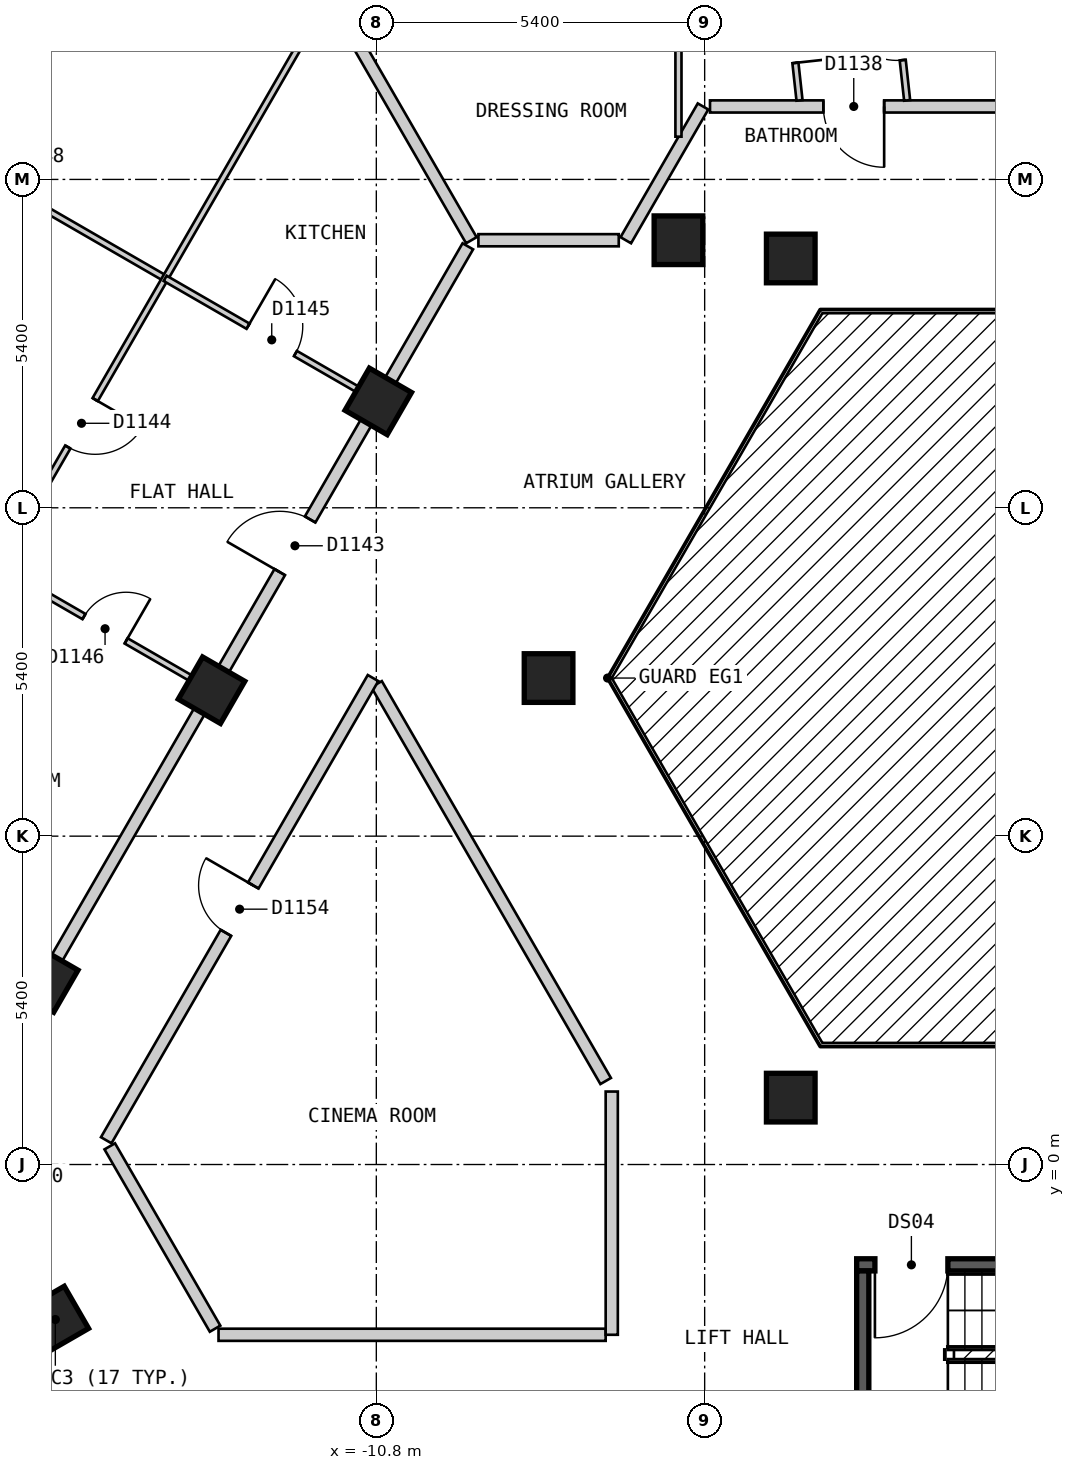
"""IFC4 building model, lengths in metres.
Left out: names, types, materials, properties, quantities, classifications, styles, units other than length and angle.
Written with IfcOpenShell. Run it as: python <this file> out.ifc"""

import sys

from ifc_helpers import new_model, si_unit, direction, frame, frame_2d, origin, origin_2d, place, context, subcontext, project, spatial, polyline, rectangle, outline, extrude, element, fill, save


model = new_model("IFC4")
c1 = context("Model", 3, precision=1e-05, world=origin(), true_north=direction((0.0, 1.0)))
c2 = subcontext(c1, "Body", "Model", "MODEL_VIEW")
j1 = project(units=[si_unit("LENGTHUNIT", "METRE"), si_unit("PLANEANGLEUNIT", "RADIAN")], contexts=[c1])
p1 = place(None, origin())
s1 = spatial("IfcSite", under=j1, at=p1, CompositionType="ELEMENT")
p2 = place(p1, origin())
s2 = spatial("IfcBuilding", under=s1, at=p2, CompositionType="ELEMENT")
p3 = place(p2, frame((0.0, 0.0, 150.6)))
s3 = spatial("IfcBuildingStorey", under=s2, at=p3, CompositionType="ELEMENT", Elevation=150.6)
for number, where, z_axis, x_axis in (
    (1, (-16.079, -2.549, 0.0), (0.0, 0.0, 1.0), (0.5, -0.866, 0.0)),
    (2, (-3.984, 14.9, 0.0), (0.0, 0.0, 1.0), (1.0, 0.0, 0.0)),
    (3, (-5.831, 15.2, 0.0), (0.0, 0.0, 1.0), (-1.0, 0.0, 0.0)),
    (4, (-10.768, 12.55, 0.0), (0.0, 0.0, 1.0), (-0.5, -0.866, 0.0)),
    (5, (-7.967, 8.0, 0.0), (0.0, 0.0, 1.0), (1.0, 0.0, 0.0)),
    (6, (-13.51, 7.8, 0.0), (0.0, 0.0, 1.0), (-0.5, -0.866, 0.0)),
    (7, (-3.984, 1.1, 0.0), (0.0, 0.0, 1.0), (1.0, 0.0, 0.0)),
    (8, (-16.253, 3.05, 0.0), (0.0, 0.0, 1.0), (-0.5, -0.866, 0.0)),
):
    element("IfcColumn", number, at=place(p3, frame(where, z_axis=z_axis, x_axis=x_axis)), inside=s3, PredefinedType="COLUMN", context=c2, shape_type="SweptSolid", body=[
        extrude(rectangle(XDim=0.8, YDim=0.8, at=origin_2d()), origin(), (0.0, 0.0, 1.0), 3.0),
    ])
p4 = place(p3, frame((-28.218, -2.025, 0.0), z_axis=(0.0, 0.0, 1.0), x_axis=(0.500017503135, -0.866015298109, 0.0)))
e9 = element("IfcWall", 9, at=p4, inside=s3, PredefinedType="SOLIDWALL", context=c2, shape_type="SweptSolid", body=[
    extrude(outline(polyline([(0.0, -0.15), (24.711, -0.15), (24.631, 0.15), (0.08, 0.15), (0.0, -0.15)])), origin(), (0.0, 0.0, 1.0), 2.6),
])
p5 = place(p4, frame((1.4, 0.0, 0.15)))
e10 = element("IfcOpeningElement", 10, at=p5, cuts=e9, PredefinedType="OPENING", context=c2, shape_type="SweptSolid", body=[
    extrude(rectangle(XDim=1.5, YDim=2.1, at=frame_2d((0.75, 1.05))), frame((0.0, 0.16, 0.0), z_axis=(0.0, -1.0, 0.0), x_axis=(1.0, 0.0, 0.0)), (0.0, 0.0, 1.0), 0.32),
])
p6 = place(p4, frame((4.316, 0.0, 0.15)))
e11 = element("IfcOpeningElement", 11, at=p6, cuts=e9, PredefinedType="OPENING", context=c2, shape_type="SweptSolid", body=[
    extrude(rectangle(XDim=1.5, YDim=2.1, at=frame_2d((0.75, 1.05))), frame((0.0, 0.16, 0.0), z_axis=(0.0, -1.0, 0.0), x_axis=(1.0, 0.0, 0.0)), (0.0, 0.0, 1.0), 0.32),
])
p7 = place(p4, frame((7.231, 0.0, 0.15)))
e12 = element("IfcOpeningElement", 12, at=p7, cuts=e9, PredefinedType="OPENING", context=c2, shape_type="SweptSolid", body=[
    extrude(rectangle(XDim=1.5, YDim=2.1, at=frame_2d((0.75, 1.05))), frame((0.0, 0.16, 0.0), z_axis=(0.0, -1.0, 0.0), x_axis=(1.0, 0.0, 0.0)), (0.0, 0.0, 1.0), 0.32),
])
p8 = place(p4, frame((10.147, 0.0, 0.15)))
e13 = element("IfcOpeningElement", 13, at=p8, cuts=e9, PredefinedType="OPENING", context=c2, shape_type="SweptSolid", body=[
    extrude(rectangle(XDim=1.5, YDim=2.1, at=frame_2d((0.75, 1.05))), frame((0.0, 0.16, 0.0), z_axis=(0.0, -1.0, 0.0), x_axis=(1.0, 0.0, 0.0)), (0.0, 0.0, 1.0), 0.32),
])
p9 = place(p4, frame((13.062, 0.0, 0.15)))
e14 = element("IfcOpeningElement", 14, at=p9, cuts=e9, PredefinedType="OPENING", context=c2, shape_type="SweptSolid", body=[
    extrude(rectangle(XDim=1.5, YDim=2.1, at=frame_2d((0.75, 1.05))), frame((0.0, 0.16, 0.0), z_axis=(0.0, -1.0, 0.0), x_axis=(1.0, 0.0, 0.0)), (0.0, 0.0, 1.0), 0.32),
])
p10 = place(p4, frame((15.977, 0.0, 0.15)))
e15 = element("IfcOpeningElement", 15, at=p10, cuts=e9, PredefinedType="OPENING", context=c2, shape_type="SweptSolid", body=[
    extrude(rectangle(XDim=1.5, YDim=2.1, at=frame_2d((0.75, 1.05))), frame((0.0, 0.16, 0.0), z_axis=(0.0, -1.0, 0.0), x_axis=(1.0, 0.0, 0.0)), (0.0, 0.0, 1.0), 0.32),
])
p11 = place(p4, frame((18.893, 0.0, 0.15)))
e16 = element("IfcOpeningElement", 16, at=p11, cuts=e9, PredefinedType="OPENING", context=c2, shape_type="SweptSolid", body=[
    extrude(rectangle(XDim=1.5, YDim=2.1, at=frame_2d((0.75, 1.05))), frame((0.0, 0.16, 0.0), z_axis=(0.0, -1.0, 0.0), x_axis=(1.0, 0.0, 0.0)), (0.0, 0.0, 1.0), 0.32),
])
p12 = place(p4, frame((21.809, 0.0, 0.15)))
e17 = element("IfcOpeningElement", 17, at=p12, cuts=e9, PredefinedType="OPENING", context=c2, shape_type="SweptSolid", body=[
    extrude(rectangle(XDim=1.5, YDim=2.1, at=frame_2d((0.75, 1.05))), frame((0.0, 0.16, 0.0), z_axis=(0.0, -1.0, 0.0), x_axis=(1.0, 0.0, 0.0)), (0.0, 0.0, 1.0), 0.32),
])
p13 = place(p3, frame((-2.9, -1.65, 0.0), z_axis=(0.0, 0.0, 1.0), x_axis=(1.0, 0.0, 0.0)))
e18 = element("IfcWall", 18, at=p13, inside=s3, PredefinedType="SOLIDWALL", context=c2, shape_type="SweptSolid", body=[
    extrude(rectangle(XDim=5.8, YDim=0.2, at=frame_2d((2.9, 0.0))), origin(), (0.0, 0.0, 1.0), 2.6),
])
p14 = place(p13, frame((0.3, 0.0, 0.0)))
e19 = element("IfcOpeningElement", 19, at=p14, cuts=e18, PredefinedType="OPENING", context=c2, shape_type="SweptSolid", body=[
    extrude(rectangle(XDim=1.2, YDim=2.1, at=frame_2d((0.6, 1.05))), frame((0.0, 0.11, 0.0), z_axis=(0.0, -1.0, 0.0), x_axis=(1.0, 0.0, 0.0)), (0.0, 0.0, 1.0), 0.22),
])
p15 = place(p3, frame((-2.8, -4.5, 0.0), z_axis=(0.0, 0.0, 1.0), x_axis=(0.0, 1.0, 0.0)))
e20 = element("IfcWall", 20, at=p15, inside=s3, PredefinedType="SOLIDWALL", context=c2, shape_type="SweptSolid", body=[
    extrude(rectangle(XDim=2.75, YDim=0.2, at=frame_2d((1.375, 0.0))), origin(), (0.0, 0.0, 1.0), 2.6),
])
p16 = place(p3, frame((-10.796, 7.9, 0.0), z_axis=(0.0, 0.0, 1.0), x_axis=(0.499954271211, -0.866051803703, 0.0)))
e21 = element("IfcWall", 21, at=p16, inside=s3, PredefinedType="PARTITIONING", context=c2, shape_type="SweptSolid", body=[
    extrude(rectangle(XDim=7.536, YDim=0.2, at=frame_2d((3.768, 0.0))), origin(), (0.0, 0.0, 1.0), 2.6),
])
p17 = place(p3, frame((-15.184, 0.299, 0.0), z_axis=(0.0, 0.0, 1.0), x_axis=(0.500149577091, -0.865939028186, 0.0)))
e22 = element("IfcWall", 22, at=p17, inside=s3, PredefinedType="PARTITIONING", context=c2, shape_type="SweptSolid", body=[
    extrude(rectangle(XDim=3.463, YDim=0.2, at=frame_2d((1.732, 0.0))), origin(), (0.0, 0.0, 1.0), 2.6),
])
p18 = place(p3, frame((-17.724, 0.299, 0.0), z_axis=(0.0, 0.0, 1.0), x_axis=(0.499910220442, -0.866077231832, 0.0)))
e23 = element("IfcWall", 23, at=p18, inside=s3, PredefinedType="PARTITIONING", context=c2, shape_type="SweptSolid", body=[
    extrude(rectangle(XDim=3.189, YDim=0.2, at=frame_2d((1.594, 0.0))), origin(), (0.0, 0.0, 1.0), 2.6),
])
p19 = place(p18, frame((0.183, 0.0, 0.0)))
e24 = element("IfcOpeningElement", 24, at=p19, cuts=e23, PredefinedType="OPENING", context=c2, shape_type="SweptSolid", body=[
    extrude(rectangle(XDim=0.8, YDim=2.1, at=frame_2d((0.4, 1.05))), frame((0.0, 0.11, 0.0), z_axis=(0.0, -1.0, 0.0), x_axis=(1.0, 0.0, 0.0)), (0.0, 0.0, 1.0), 0.22),
])
p20 = place(p3, frame((-13.395, -2.8, 0.0), z_axis=(0.0, 0.0, 1.0), x_axis=(1.0, 0.0, 0.0)))
e25 = element("IfcWall", 25, at=p20, inside=s3, PredefinedType="PARTITIONING", context=c2, shape_type="SweptSolid", body=[
    extrude(rectangle(XDim=6.367, YDim=0.2, at=frame_2d((3.184, 0.0))), origin(), (0.0, 0.0, 1.0), 2.6),
])
p21 = place(p3, frame((-9.121, 15.2, 0.0), z_axis=(0.0, 0.0, 1.0), x_axis=(1.0, 0.0, 0.0)))
e26 = element("IfcWall", 26, at=p21, inside=s3, PredefinedType="PARTITIONING", context=c2, shape_type="SweptSolid", body=[
    extrude(rectangle(XDim=2.308, YDim=0.2, at=frame_2d((1.154, 0.0))), origin(), (0.0, 0.0, 1.0), 2.6),
])
p22 = place(p3, frame((-5.312, 17.4, 0.0), z_axis=(0.0, 0.0, 1.0), x_axis=(1.0, 0.0, 0.0)))
e27 = element("IfcWall", 27, at=p22, inside=s3, PredefinedType="PARTITIONING", context=c2, shape_type="SweptSolid", body=[
    extrude(rectangle(XDim=10.739, YDim=0.2, at=frame_2d((5.37, 0.0))), origin(), (0.0, 0.0, 1.0), 2.6),
])
p23 = place(p22, frame((7.538, 0.0, 0.0)))
e28 = element("IfcOpeningElement", 28, at=p23, cuts=e27, PredefinedType="OPENING", context=c2, shape_type="SweptSolid", body=[
    extrude(rectangle(XDim=1.0, YDim=2.1, at=frame_2d((0.5, 1.05))), frame((0.0, 0.11, 0.0), z_axis=(0.0, -1.0, 0.0), x_axis=(1.0, 0.0, 0.0)), (0.0, 0.0, 1.0), 0.22),
])
p24 = place(p22, frame((1.864, 0.0, 0.0)))
e29 = element("IfcOpeningElement", 29, at=p24, cuts=e27, PredefinedType="OPENING", context=c2, shape_type="SweptSolid", body=[
    extrude(rectangle(XDim=1.0, YDim=2.1, at=frame_2d((0.5, 1.05))), frame((0.0, 0.11, 0.0), z_axis=(0.0, -1.0, 0.0), x_axis=(1.0, 0.0, 0.0)), (0.0, 0.0, 1.0), 0.22),
])
p25 = place(p3, frame((-15.242, 0.399, 0.0), z_axis=(0.0, 0.0, 1.0), x_axis=(0.499953615651, 0.866052182145, 0.0)))
e30 = element("IfcWall", 30, at=p25, inside=s3, PredefinedType="PARTITIONING", context=c2, shape_type="SweptSolid", body=[
    extrude(rectangle(XDim=8.777, YDim=0.2, at=frame_2d((4.388, 0.0))), origin(), (0.0, 0.0, 1.0), 2.6),
])
p26 = place(p25, frame((3.938, 0.0, 0.0)))
e31 = element("IfcOpeningElement", 31, at=p26, cuts=e30, PredefinedType="OPENING", context=c2, shape_type="SweptSolid", body=[
    extrude(rectangle(XDim=0.9, YDim=2.1, at=frame_2d((0.45, 1.05))), frame((0.0, 0.11, 0.0), z_axis=(0.0, -1.0, 0.0), x_axis=(1.0, 0.0, 0.0)), (0.0, 0.0, 1.0), 0.22),
])
p27 = place(p3, frame((-6.697, 15.2, 0.0), z_axis=(0.0, 0.0, 1.0), x_axis=(0.499963722229, 0.866046347752, 0.0)))
e32 = element("IfcWall", 32, at=p27, inside=s3, PredefinedType="PARTITIONING", context=c2, shape_type="SweptSolid", body=[
    extrude(rectangle(XDim=2.54, YDim=0.2, at=frame_2d((1.27, 0.0))), origin(), (0.0, 0.0, 1.0), 2.6),
])
p28 = place(p3, frame((-17.724, 0.5, 0.0), z_axis=(0.0, 0.0, 1.0), x_axis=(0.499992388462, 0.866029798263, 0.0)))
e33 = element("IfcWall", 33, at=p28, inside=s3, PredefinedType="PARTITIONING", context=c2, shape_type="SweptSolid", body=[
    extrude(rectangle(XDim=16.859, YDim=0.2, at=frame_2d((8.429, 0.0))), origin(), (0.0, 0.0, 1.0), 2.6),
])
p29 = place(p28, frame((10.672, 0.0, 0.0)))
e34 = element("IfcOpeningElement", 34, at=p29, cuts=e33, PredefinedType="OPENING", context=c2, shape_type="SweptSolid", body=[
    extrude(rectangle(XDim=1.0, YDim=2.1, at=frame_2d((0.5, 1.05))), frame((0.0, 0.11, 0.0), z_axis=(0.0, -1.0, 0.0), x_axis=(1.0, 0.0, 0.0)), (0.0, 0.0, 1.0), 0.22),
])
p30 = place(p3, frame((-6.928, -2.8, 0.0), z_axis=(0.0, 0.0, 1.0), x_axis=(0.0, 1.0, 0.0)))
e35 = element("IfcWall", 35, at=p30, inside=s3, PredefinedType="PARTITIONING", context=c2, shape_type="SweptSolid", body=[
    extrude(rectangle(XDim=4.0, YDim=0.2, at=frame_2d((2.0, 0.0))), origin(), (0.0, 0.0, 1.0), 2.6),
])
p31 = place(p3, frame((-2.319, 19.77, 0.0), z_axis=(0.0, 0.0, 1.0), x_axis=(0.109046821538, -0.994036614372, 0.0)))
e36 = element("IfcWall", 36, at=p31, inside=s3, PredefinedType="PARTITIONING", context=c2, shape_type="SweptSolid", body=[
    extrude(rectangle(XDim=2.284, YDim=0.1, at=frame_2d((1.142, 0.0))), origin(), (0.0, 0.0, 1.0), 2.6),
])
p32 = place(p31, frame((0.717, 0.0, 0.0)))
e37 = element("IfcOpeningElement", 37, at=p32, cuts=e36, PredefinedType="OPENING", context=c2, shape_type="SweptSolid", body=[
    extrude(rectangle(XDim=0.9, YDim=2.1, at=frame_2d((0.45, 1.05))), frame((0.0, 0.06, 0.0), z_axis=(0.0, -1.0, 0.0), x_axis=(1.0, 0.0, 0.0)), (0.0, 0.0, 1.0), 0.12),
])
p33 = place(p3, frame((-4.068, 19.579, 0.0), z_axis=(0.0, 0.0, 1.0), x_axis=(0.109022161139, -0.994039319333, 0.0)))
e38 = element("IfcWall", 38, at=p33, inside=s3, PredefinedType="PARTITIONING", context=c2, shape_type="SweptSolid", body=[
    extrude(rectangle(XDim=2.092, YDim=0.1, at=frame_2d((1.046, 0.0))), origin(), (0.0, 0.0, 1.0), 2.6),
])
p34 = place(p33, frame((0.671, 0.0, 0.0)))
e39 = element("IfcOpeningElement", 39, at=p34, cuts=e38, PredefinedType="OPENING", context=c2, shape_type="SweptSolid", body=[
    extrude(rectangle(XDim=0.8, YDim=2.1, at=frame_2d((0.4, 1.05))), frame((0.0, 0.06, 0.0), z_axis=(0.0, -1.0, 0.0), x_axis=(1.0, 0.0, 0.0)), (0.0, 0.0, 1.0), 0.12),
])
p35 = place(p3, frame((-16.971, 9.798, 0.0), z_axis=(0.0, 0.0, 1.0), x_axis=(0.866087525071, -0.499892387336, 0.0)))
e40 = element("IfcWall", 40, at=p35, inside=s3, PredefinedType="PARTITIONING", context=c2, shape_type="SweptSolid", body=[
    extrude(rectangle(XDim=3.897, YDim=0.1, at=frame_2d((1.948, 0.0))), origin(), (0.0, 0.0, 1.0), 2.6),
])
p36 = place(p35, frame((1.574, 0.0, 0.0)))
e41 = element("IfcOpeningElement", 41, at=p36, cuts=e40, PredefinedType="OPENING", context=c2, shape_type="SweptSolid", body=[
    extrude(rectangle(XDim=0.8, YDim=2.1, at=frame_2d((0.4, 1.05))), frame((0.0, 0.06, 0.0), z_axis=(0.0, -1.0, 0.0), x_axis=(1.0, 0.0, 0.0)), (0.0, 0.0, 1.0), 0.12),
])
p37 = place(p3, frame((-19.514, 17.599, 0.0), z_axis=(0.0, 0.0, 1.0), x_axis=(0.866007554612, -0.500030914399, 0.0)))
e42 = element("IfcWall", 42, at=p37, inside=s3, PredefinedType="PARTITIONING", context=c2, shape_type="SweptSolid", body=[
    extrude(rectangle(XDim=6.052, YDim=0.1, at=frame_2d((3.026, 0.0))), origin(), (0.0, 0.0, 1.0), 2.6),
])
p38 = place(p37, frame((2.576, 0.0, 0.0)))
e43 = element("IfcOpeningElement", 43, at=p38, cuts=e42, PredefinedType="OPENING", context=c2, shape_type="SweptSolid", body=[
    extrude(rectangle(XDim=0.9, YDim=2.1, at=frame_2d((0.45, 1.05))), frame((0.0, 0.06, 0.0), z_axis=(0.0, -1.0, 0.0), x_axis=(1.0, 0.0, 0.0)), (0.0, 0.0, 1.0), 0.12),
])
p39 = place(p3, frame((-22.398, 0.499, 0.0), z_axis=(0.0, 0.0, 1.0), x_axis=(0.499981561717, 0.866036048871, 0.0)))
e44 = element("IfcWall", 44, at=p39, inside=s3, PredefinedType="PARTITIONING", context=c2, shape_type="SweptSolid", body=[
    extrude(rectangle(XDim=21.532, YDim=0.1, at=frame_2d((10.766, 0.0))), origin(), (0.0, 0.0, 1.0), 2.6),
])
p40 = place(p39, frame((13.049, 0.0, 0.0)))
e45 = element("IfcOpeningElement", 45, at=p40, cuts=e44, PredefinedType="OPENING", context=c2, shape_type="SweptSolid", body=[
    extrude(rectangle(XDim=0.9, YDim=2.1, at=frame_2d((0.45, 1.05))), frame((0.0, 0.06, 0.0), z_axis=(0.0, -1.0, 0.0), x_axis=(1.0, 0.0, 0.0)), (0.0, 0.0, 1.0), 0.12),
])
p41 = place(p39, frame((2.183, 0.0, 0.0)))
e46 = element("IfcOpeningElement", 46, at=p41, cuts=e44, PredefinedType="OPENING", context=c2, shape_type="SweptSolid", body=[
    extrude(rectangle(XDim=0.8, YDim=2.1, at=frame_2d((0.4, 1.05))), frame((0.0, 0.06, 0.0), z_axis=(0.0, -1.0, 0.0), x_axis=(1.0, 0.0, 0.0)), (0.0, 0.0, 1.0), 0.12),
])
p42 = place(p3, frame((-5.831, 16.903, 0.0), z_axis=(0.0, 0.0, 1.0), x_axis=(0.0, 1.0, 0.0)))
e47 = element("IfcWall", 47, at=p42, inside=s3, PredefinedType="PARTITIONING", context=c2, shape_type="SweptSolid", body=[
    extrude(rectangle(XDim=2.553, YDim=0.1, at=frame_2d((1.276, 0.0))), origin(), (0.0, 0.0, 1.0), 2.6),
])
p43 = place(p3, frame((-11.52, 19.155, 0.0), z_axis=(0.0, 0.0, 1.0), x_axis=(0.499916824138, -0.866073420066, 0.0)))
e48 = element("IfcWall", 48, at=p43, inside=s3, PredefinedType="PARTITIONING", context=c2, shape_type="SweptSolid", body=[
    extrude(rectangle(XDim=4.567, YDim=0.2, at=frame_2d((2.283, 0.0))), origin(), (0.0, 0.0, 1.0), 2.6),
])
p44 = place(p3, frame((-17.956, -3.783, 0.0), z_axis=(0.0, 0.0, 1.0), x_axis=(0.964815336827, -0.2629284424, 0.0)))
e49 = element("IfcWall", 49, at=p44, inside=s3, PredefinedType="PARTITIONING", context=c2, shape_type="SweptSolid", body=[
    extrude(rectangle(XDim=2.514, YDim=0.2, at=frame_2d((1.257, 0.0))), origin(), (0.0, 0.0, 1.0), 2.6),
])
p45 = place(p3, frame((-18.096, -3.714, 0.0), z_axis=(0.0, 0.0, 1.0), x_axis=(0.865794513859, 0.500399700011, 0.0)))
e50 = element("IfcWall", 50, at=p45, inside=s3, PredefinedType="PARTITIONING", context=c2, shape_type="SweptSolid", body=[
    extrude(rectangle(XDim=2.298, YDim=0.2, at=frame_2d((1.149, 0.0))), origin(), (0.0, 0.0, 1.0), 2.6),
])
p46 = place(p3, frame((-14.273, 14.573, 0.0), z_axis=(0.0, 0.0, 1.0), x_axis=(0.866138216955, -0.499804550929, 0.0)))
e51 = element("IfcWall", 51, at=p46, inside=s3, PredefinedType="PARTITIONING", context=c2, shape_type="SweptSolid", body=[
    extrude(rectangle(XDim=3.947, YDim=0.1, at=frame_2d((1.974, 0.0))), origin(), (0.0, 0.0, 1.0), 2.6),
])
p47 = place(p46, frame((1.574, 0.0, 0.0)))
e52 = element("IfcOpeningElement", 52, at=p47, cuts=e51, PredefinedType="OPENING", context=c2, shape_type="SweptSolid", body=[
    extrude(rectangle(XDim=0.9, YDim=2.1, at=frame_2d((0.45, 1.05))), frame((0.0, 0.06, 0.0), z_axis=(0.0, -1.0, 0.0), x_axis=(1.0, 0.0, 0.0)), (0.0, 0.0, 1.0), 0.12),
])
p48 = place(p14, origin())
e53 = element("IfcDoor", 53, at=p48, inside=s3, OperationType="SINGLE_SWING_LEFT", PredefinedType="DOOR", context=c2, shape_type="SweptSolid", body=[
    extrude(rectangle(XDim=1.2, YDim=2.1, at=frame_2d((0.6, 1.05))), frame((0.0, 0.025, 0.0), z_axis=(0.0, -1.0, 0.0), x_axis=(1.0, 0.0, 0.0)), (0.0, 0.0, 1.0), 0.05),
])
fill(e19, e53)
p49 = place(p24, origin())
e54 = element("IfcDoor", 54, at=p49, inside=s3, OperationType="SINGLE_SWING_RIGHT", PredefinedType="DOOR", context=c2, shape_type="SweptSolid", body=[
    extrude(rectangle(XDim=1.0, YDim=2.1, at=frame_2d((0.5, 1.05))), frame((0.0, 0.025, 0.0), z_axis=(0.0, -1.0, 0.0), x_axis=(1.0, 0.0, 0.0)), (0.0, 0.0, 1.0), 0.05),
])
fill(e29, e54)
p50 = place(p32, origin())
e55 = element("IfcDoor", 55, at=p50, inside=s3, OperationType="SINGLE_SWING_LEFT", PredefinedType="DOOR", context=c2, shape_type="SweptSolid", body=[
    extrude(rectangle(XDim=0.9, YDim=2.1, at=frame_2d((0.45, 1.05))), frame((0.0, 0.025, 0.0), z_axis=(0.0, -1.0, 0.0), x_axis=(1.0, 0.0, 0.0)), (0.0, 0.0, 1.0), 0.05),
])
fill(e37, e55)
p51 = place(p34, origin())
e56 = element("IfcDoor", 56, at=p51, inside=s3, OperationType="SINGLE_SWING_RIGHT", PredefinedType="DOOR", context=c2, shape_type="SweptSolid", body=[
    extrude(rectangle(XDim=0.8, YDim=2.1, at=frame_2d((0.4, 1.05))), frame((0.0, 0.025, 0.0), z_axis=(0.0, -1.0, 0.0), x_axis=(1.0, 0.0, 0.0)), (0.0, 0.0, 1.0), 0.05),
])
fill(e39, e56)
p52 = place(p29, origin())
e57 = element("IfcDoor", 57, at=p52, inside=s3, OperationType="SINGLE_SWING_LEFT", PredefinedType="DOOR", context=c2, shape_type="SweptSolid", body=[
    extrude(rectangle(XDim=1.0, YDim=2.1, at=frame_2d((0.5, 1.05))), frame((0.0, 0.025, 0.0), z_axis=(0.0, -1.0, 0.0), x_axis=(1.0, 0.0, 0.0)), (0.0, 0.0, 1.0), 0.05),
])
fill(e34, e57)
p53 = place(p40, origin())
e58 = element("IfcDoor", 58, at=p53, inside=s3, OperationType="SINGLE_SWING_RIGHT", PredefinedType="DOOR", context=c2, shape_type="SweptSolid", body=[
    extrude(rectangle(XDim=0.9, YDim=2.1, at=frame_2d((0.45, 1.05))), frame((0.0, 0.025, 0.0), z_axis=(0.0, -1.0, 0.0), x_axis=(1.0, 0.0, 0.0)), (0.0, 0.0, 1.0), 0.05),
])
fill(e45, e58)
p54 = place(p47, origin())
e59 = element("IfcDoor", 59, at=p54, inside=s3, OperationType="SINGLE_SWING_LEFT", PredefinedType="DOOR", context=c2, shape_type="SweptSolid", body=[
    extrude(rectangle(XDim=0.9, YDim=2.1, at=frame_2d((0.45, 1.05))), frame((0.0, 0.025, 0.0), z_axis=(0.0, -1.0, 0.0), x_axis=(1.0, 0.0, 0.0)), (0.0, 0.0, 1.0), 0.05),
])
fill(e52, e59)
p55 = place(p36, origin())
e60 = element("IfcDoor", 60, at=p55, inside=s3, OperationType="SINGLE_SWING_RIGHT", PredefinedType="DOOR", context=c2, shape_type="SweptSolid", body=[
    extrude(rectangle(XDim=0.8, YDim=2.1, at=frame_2d((0.4, 1.05))), frame((0.0, 0.025, 0.0), z_axis=(0.0, -1.0, 0.0), x_axis=(1.0, 0.0, 0.0)), (0.0, 0.0, 1.0), 0.05),
])
fill(e41, e60)
p56 = place(p26, origin())
e61 = element("IfcDoor", 61, at=p56, inside=s3, OperationType="SINGLE_SWING_RIGHT", PredefinedType="DOOR", context=c2, shape_type="SweptSolid", body=[
    extrude(rectangle(XDim=0.9, YDim=2.1, at=frame_2d((0.45, 1.05))), frame((0.0, 0.025, 0.0), z_axis=(0.0, -1.0, 0.0), x_axis=(1.0, 0.0, 0.0)), (0.0, 0.0, 1.0), 0.05),
])
fill(e31, e61)
save(model, sys.argv[1])
